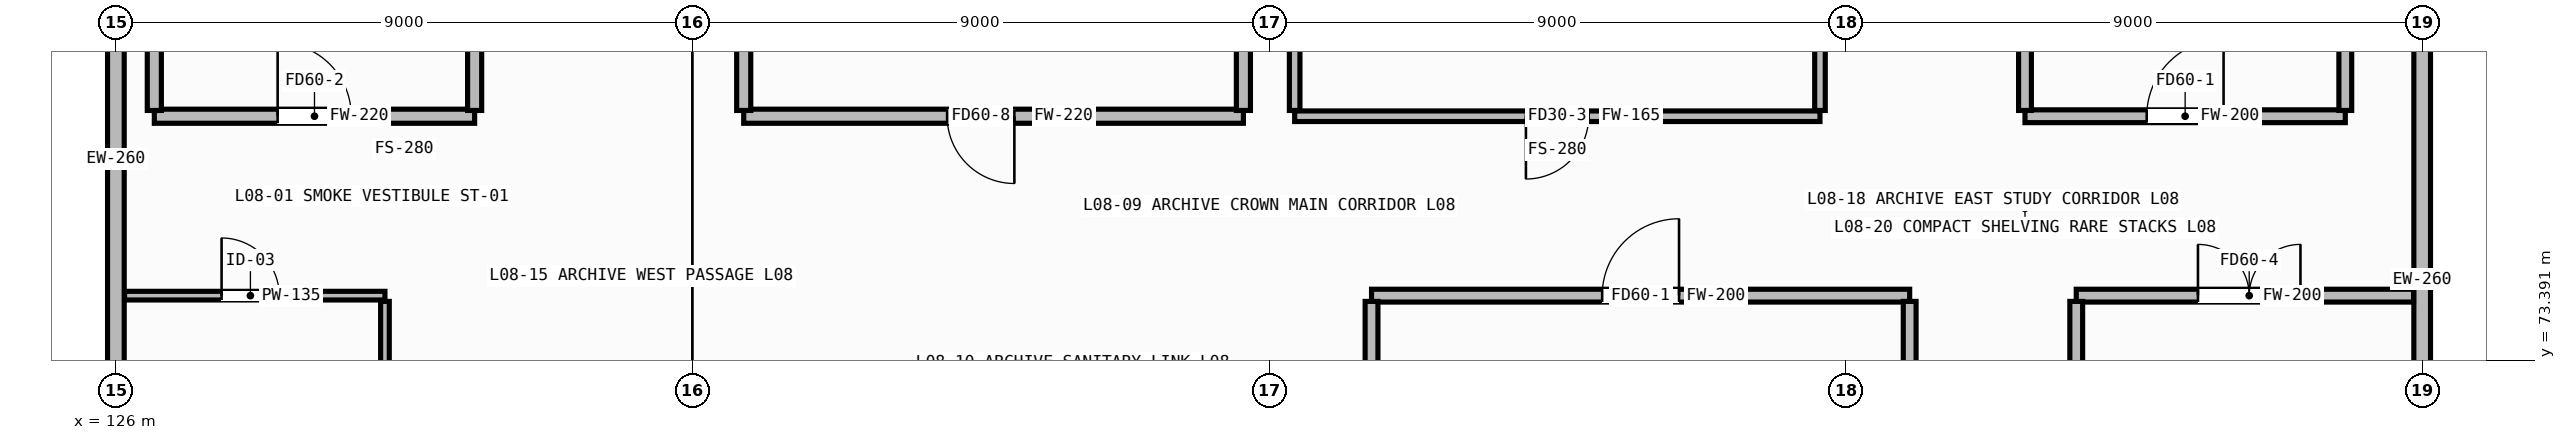
"""IFC4 building model, lengths in metres.
Left out: names, types, materials, properties, quantities, classifications, styles, units other than length and angle.
Written with IfcOpenShell. Run it as: python <this file> out.ifc"""

import sys

from ifc_helpers import new_model, si_unit, direction, frame, frame_2d, origin, place, context, subcontext, project, spatial, rectangle, extrude, element, fill, save


model = new_model("IFC4")
c1 = context("Model", 3, precision=1e-05, world=origin(), true_north=direction((0.0, 1.0)))
c2 = subcontext(c1, "Body", "Model", "MODEL_VIEW")
j1 = project(units=[si_unit("LENGTHUNIT", "METRE"), si_unit("PLANEANGLEUNIT", "RADIAN")], contexts=[c1])
p1 = place(None, origin())
s1 = spatial("IfcSite", under=j1, at=p1, CompositionType="ELEMENT")
p2 = place(p1, origin())
s2 = spatial("IfcBuilding", under=s1, at=p2, CompositionType="ELEMENT")
p3 = place(p2, frame((0.0, 0.0, 27.8)))
s3 = spatial("IfcBuildingStorey", under=s2, at=p3, CompositionType="ELEMENT", Elevation=27.8)
p4 = place(p3, frame((126.0, 72.25, 0.0), z_axis=(0.0, 0.0, 1.0), x_axis=(0.0, 1.0, 0.0)))
e1 = element("IfcWall", 1, at=p4, inside=s3, PredefinedType="STANDARD", context=c2, shape_type="SweptSolid", body=[
    extrude(rectangle(XDim=6.7, YDim=0.26, at=frame_2d((3.35, 0.0))), origin(), (0.0, 0.0, 1.0), 2.915),
])
p5 = place(p3, frame((162.0, 78.975, 0.0), z_axis=(0.0, 0.0, 1.0), x_axis=(0.0, -1.0, 0.0)))
e2 = element("IfcWall", 2, at=p5, inside=s3, PredefinedType="STANDARD", context=c2, shape_type="SweptSolid", body=[
    extrude(rectangle(XDim=6.75, YDim=0.26, at=frame_2d((3.375, 0.0))), origin(), (0.0, 0.0, 1.0), 2.915),
])
p6 = place(p3, frame((126.6, 77.2, 0.0), z_axis=(0.0, 0.0, 1.0), x_axis=(1.0, 0.0, 0.0)))
e3 = element("IfcWall", 3, at=p6, inside=s3, PredefinedType="PARTITIONING", context=c2, shape_type="SweptSolid", body=[
    extrude(rectangle(XDim=5.0, YDim=0.22, at=frame_2d((2.5, 0.0))), origin(), (0.0, 0.0, 1.0), 3.315),
])
p7 = place(p6, frame((1.925, 0.0, 0.0)))
e4 = element("IfcOpeningElement", 4, at=p7, cuts=e3, PredefinedType="OPENING", context=c2, shape_type="SweptSolid", body=[
    extrude(rectangle(XDim=1.15, YDim=2.1, at=frame_2d((0.575, 1.05))), frame((0.0, 0.122, 0.0), z_axis=(0.0, -1.0, 0.0), x_axis=(1.0, 0.0, 0.0)), (0.0, 0.0, 1.0), 0.244),
])
for number, where, z_axis, x_axis in (
    (5, (126.6, 77.29, 0.0), (0.0, 0.0, 1.0), (0.0, 1.0, 0.0)),
    (6, (131.6, 77.29, 0.0), (0.0, 0.0, 1.0), (0.0, 1.0, 0.0)),
):
    element("IfcWall", number, at=place(p3, frame(where, z_axis=z_axis, x_axis=x_axis)), inside=s3, PredefinedType="PARTITIONING", context=c2, shape_type="SweptSolid", body=[
        extrude(rectangle(XDim=3.82, YDim=0.22, at=frame_2d((1.91, 0.0))), origin(), (0.0, 0.0, 1.0), 3.315),
    ])
p8 = place(p3, frame((155.8, 77.2, 0.0), z_axis=(0.0, 0.0, 1.0), x_axis=(1.0, 0.0, 0.0)))
e7 = element("IfcWall", 7, at=p8, inside=s3, PredefinedType="PARTITIONING", context=c2, shape_type="SweptSolid", body=[
    extrude(rectangle(XDim=5.0, YDim=0.2, at=frame_2d((2.5, 0.0))), origin(), (0.0, 0.0, 1.0), 3.315),
])
p9 = place(p8, frame((1.9, 0.0, 0.0)))
e8 = element("IfcOpeningElement", 8, at=p9, cuts=e7, PredefinedType="OPENING", context=c2, shape_type="SweptSolid", body=[
    extrude(rectangle(XDim=1.2, YDim=2.1, at=frame_2d((0.6, 1.05))), frame((0.0, 0.112, 0.0), z_axis=(0.0, -1.0, 0.0), x_axis=(1.0, 0.0, 0.0)), (0.0, 0.0, 1.0), 0.224),
])
for number, where, z_axis, x_axis in (
    (9, (155.8, 77.29, 0.0), (0.0, 0.0, 1.0), (0.0, 1.0, 0.0)),
    (10, (160.8, 77.29, 0.0), (0.0, 0.0, 1.0), (0.0, 1.0, 0.0)),
):
    element("IfcWall", number, at=place(p3, frame(where, z_axis=z_axis, x_axis=x_axis)), inside=s3, PredefinedType="PARTITIONING", context=c2, shape_type="SweptSolid", body=[
        extrude(rectangle(XDim=3.82, YDim=0.2, at=frame_2d((1.91, 0.0))), origin(), (0.0, 0.0, 1.0), 3.315),
    ])
p10 = place(p3, frame((135.8, 77.2, 0.0), z_axis=(0.0, 0.0, 1.0), x_axis=(1.0, 0.0, 0.0)))
e11 = element("IfcWall", 11, at=p10, inside=s3, PredefinedType="PARTITIONING", context=c2, shape_type="SweptSolid", body=[
    extrude(rectangle(XDim=7.8, YDim=0.22, at=frame_2d((3.9, 0.0))), origin(), (0.0, 0.0, 1.0), 3.315),
])
p11 = place(p10, frame((3.175, 0.0, 0.0)))
e12 = element("IfcOpeningElement", 12, at=p11, cuts=e11, PredefinedType="OPENING", context=c2, shape_type="SweptSolid", body=[
    extrude(rectangle(XDim=1.05, YDim=2.02, at=frame_2d((0.525, 1.01))), frame((0.0, 0.122, 0.0), z_axis=(0.0, -1.0, 0.0), x_axis=(1.0, 0.0, 0.0)), (0.0, 0.0, 1.0), 0.244),
])
for number, where, z_axis, x_axis in (
    (13, (135.8, 77.29, 0.0), (0.0, 0.0, 1.0), (0.0, 1.0, 0.0)),
    (14, (143.6, 77.29, 0.0), (0.0, 0.0, 1.0), (0.0, 1.0, 0.0)),
):
    element("IfcWall", number, at=place(p3, frame(where, z_axis=z_axis, x_axis=x_axis)), inside=s3, PredefinedType="PARTITIONING", context=c2, shape_type="SweptSolid", body=[
        extrude(rectangle(XDim=3.82, YDim=0.22, at=frame_2d((1.91, 0.0))), origin(), (0.0, 0.0, 1.0), 3.315),
    ])
p12 = place(p3, frame((144.4, 77.2, 0.0), z_axis=(0.0, 0.0, 1.0), x_axis=(1.0, 0.0, 0.0)))
e15 = element("IfcWall", 15, at=p12, inside=s3, PredefinedType="PARTITIONING", context=c2, shape_type="SweptSolid", body=[
    extrude(rectangle(XDim=8.2, YDim=0.165, at=frame_2d((4.1, 0.0))), origin(), (0.0, 0.0, 1.0), 3.315),
])
p13 = place(p12, frame((3.61, 0.0, 0.0)))
e16 = element("IfcOpeningElement", 16, at=p13, cuts=e15, PredefinedType="OPENING", context=c2, shape_type="SweptSolid", body=[
    extrude(rectangle(XDim=0.98, YDim=2.02, at=frame_2d((0.49, 1.01))), frame((0.0, 0.094, 0.0), z_axis=(0.0, -1.0, 0.0), x_axis=(1.0, 0.0, 0.0)), (0.0, 0.0, 1.0), 0.189),
])
for number, where, z_axis, x_axis in (
    (17, (144.4, 77.29, 0.0), (0.0, 0.0, 1.0), (0.0, 1.0, 0.0)),
    (18, (152.6, 77.29, 0.0), (0.0, 0.0, 1.0), (0.0, 1.0, 0.0)),
):
    element("IfcWall", number, at=place(p3, frame(where, z_axis=z_axis, x_axis=x_axis)), inside=s3, PredefinedType="PARTITIONING", context=c2, shape_type="SweptSolid", body=[
        extrude(rectangle(XDim=3.82, YDim=0.165, at=frame_2d((1.91, 0.0))), origin(), (0.0, 0.0, 1.0), 3.315),
    ])
p14 = place(p3, frame((126.135, 74.4, 0.0), z_axis=(0.0, 0.0, 1.0), x_axis=(1.0, 0.0, 0.0)))
e19 = element("IfcWall", 19, at=p14, inside=s3, PredefinedType="PARTITIONING", context=c2, shape_type="SweptSolid", body=[
    extrude(rectangle(XDim=4.065, YDim=0.135, at=frame_2d((2.032, 0.0))), origin(), (0.0, 0.0, 1.0), 3.315),
])
p15 = place(p14, frame((1.515, 0.0, 0.0)))
e20 = element("IfcOpeningElement", 20, at=p15, cuts=e19, PredefinedType="OPENING", context=c2, shape_type="SweptSolid", body=[
    extrude(rectangle(XDim=0.9, YDim=2.02, at=frame_2d((0.45, 1.01))), frame((0.0, 0.08, 0.0), z_axis=(0.0, -1.0, 0.0), x_axis=(1.0, 0.0, 0.0)), (0.0, 0.0, 1.0), 0.159),
])
p16 = place(p3, frame((130.2, 66.09, 0.0), z_axis=(0.0, 0.0, 1.0), x_axis=(0.0, 1.0, 0.0)))
e21 = element("IfcWall", 21, at=p16, inside=s3, PredefinedType="PARTITIONING", context=c2, shape_type="SweptSolid", body=[
    extrude(rectangle(XDim=8.22, YDim=0.135, at=frame_2d((4.11, 0.0))), origin(), (0.0, 0.0, 1.0), 3.315),
])
p17 = place(p3, frame((145.6, 74.4, 0.0), z_axis=(0.0, 0.0, 1.0), x_axis=(1.0, 0.0, 0.0)))
e22 = element("IfcWall", 22, at=p17, inside=s3, PredefinedType="PARTITIONING", context=c2, shape_type="SweptSolid", body=[
    extrude(rectangle(XDim=8.4, YDim=0.2, at=frame_2d((4.2, 0.0))), origin(), (0.0, 0.0, 1.0), 3.315),
])
p18 = place(p17, frame((3.6, 0.0, 0.0)))
e23 = element("IfcOpeningElement", 23, at=p18, cuts=e22, PredefinedType="OPENING", context=c2, shape_type="SweptSolid", body=[
    extrude(rectangle(XDim=1.2, YDim=2.1, at=frame_2d((0.6, 1.05))), frame((0.0, 0.112, 0.0), z_axis=(0.0, -1.0, 0.0), x_axis=(1.0, 0.0, 0.0)), (0.0, 0.0, 1.0), 0.224),
])
p19 = place(p3, frame((145.6, 57.635, 0.0), z_axis=(0.0, 0.0, 1.0), x_axis=(0.0, 1.0, 0.0)))
e24 = element("IfcWall", 24, at=p19, inside=s3, PredefinedType="PARTITIONING", context=c2, shape_type="SweptSolid", body=[
    extrude(rectangle(XDim=16.675, YDim=0.2, at=frame_2d((8.337, 0.0))), origin(), (0.0, 0.0, 1.0), 3.315),
])
p20 = place(p3, frame((154.0, 57.735, 0.0), z_axis=(0.0, 0.0, 1.0), x_axis=(0.0, 1.0, 0.0)))
e25 = element("IfcWall", 25, at=p20, inside=s3, PredefinedType="PARTITIONING", context=c2, shape_type="SweptSolid", body=[
    extrude(rectangle(XDim=16.575, YDim=0.2, at=frame_2d((8.288, 0.0))), origin(), (0.0, 0.0, 1.0), 3.315),
])
p21 = place(p3, frame((156.6, 74.4, 0.0), z_axis=(0.0, 0.0, 1.0), x_axis=(1.0, 0.0, 0.0)))
e26 = element("IfcWall", 26, at=p21, inside=s3, PredefinedType="PARTITIONING", context=c2, shape_type="SweptSolid", body=[
    extrude(rectangle(XDim=5.265, YDim=0.2, at=frame_2d((2.632, 0.0))), origin(), (0.0, 0.0, 1.0), 3.315),
])
p22 = place(p21, frame((1.9, 0.0, 0.0)))
e27 = element("IfcOpeningElement", 27, at=p22, cuts=e26, PredefinedType="OPENING", context=c2, shape_type="SweptSolid", body=[
    extrude(rectangle(XDim=1.6, YDim=2.12, at=frame_2d((0.8, 1.06))), frame((0.0, 0.112, 0.0), z_axis=(0.0, -1.0, 0.0), x_axis=(1.0, 0.0, 0.0)), (0.0, 0.0, 1.0), 0.224),
])
p23 = place(p3, frame((156.6, 66.09, 0.0), z_axis=(0.0, 0.0, 1.0), x_axis=(0.0, 1.0, 0.0)))
e28 = element("IfcWall", 28, at=p23, inside=s3, PredefinedType="PARTITIONING", context=c2, shape_type="SweptSolid", body=[
    extrude(rectangle(XDim=8.22, YDim=0.2, at=frame_2d((4.11, 0.0))), origin(), (0.0, 0.0, 1.0), 3.315),
])
p24 = place(p7, origin())
e29 = element("IfcDoor", 29, at=p24, inside=s3, OperationType="SINGLE_SWING_LEFT", PredefinedType="DOOR", context=c2, shape_type="SweptSolid", body=[
    extrude(rectangle(XDim=1.15, YDim=2.1, at=frame_2d((0.575, 1.05))), frame((0.0, 0.025, 0.0), z_axis=(0.0, -1.0, 0.0), x_axis=(1.0, 0.0, 0.0)), (0.0, 0.0, 1.0), 0.05),
])
fill(e4, e29)
p25 = place(p9, origin())
e30 = element("IfcDoor", 30, at=p25, inside=s3, OperationType="SINGLE_SWING_RIGHT", PredefinedType="DOOR", context=c2, shape_type="SweptSolid", body=[
    extrude(rectangle(XDim=1.2, YDim=2.1, at=frame_2d((0.6, 1.05))), frame((0.0, 0.025, 0.0), z_axis=(0.0, -1.0, 0.0), x_axis=(1.0, 0.0, 0.0)), (0.0, 0.0, 1.0), 0.05),
])
fill(e8, e30)
p26 = place(p11, frame((1.05, 0.0, 0.0), z_axis=(0.0, 0.0, 1.0), x_axis=(-1.0, 0.0, 0.0)))
e31 = element("IfcDoor", 31, at=p26, inside=s3, OperationType="SINGLE_SWING_LEFT", PredefinedType="DOOR", context=c2, shape_type="SweptSolid", body=[
    extrude(rectangle(XDim=1.05, YDim=2.02, at=frame_2d((0.525, 1.01))), frame((0.0, 0.025, 0.0), z_axis=(0.0, -1.0, 0.0), x_axis=(1.0, 0.0, 0.0)), (0.0, 0.0, 1.0), 0.05),
])
fill(e12, e31)
p27 = place(p13, frame((0.98, 0.0, 0.0), z_axis=(0.0, 0.0, 1.0), x_axis=(-1.0, 0.0, 0.0)))
e32 = element("IfcDoor", 32, at=p27, inside=s3, OperationType="SINGLE_SWING_RIGHT", PredefinedType="DOOR", context=c2, shape_type="SweptSolid", body=[
    extrude(rectangle(XDim=0.98, YDim=2.02, at=frame_2d((0.49, 1.01))), frame((0.0, 0.025, 0.0), z_axis=(0.0, -1.0, 0.0), x_axis=(1.0, 0.0, 0.0)), (0.0, 0.0, 1.0), 0.05),
])
fill(e16, e32)
p28 = place(p15, origin())
e33 = element("IfcDoor", 33, at=p28, inside=s3, OperationType="SINGLE_SWING_LEFT", PredefinedType="DOOR", context=c2, shape_type="SweptSolid", body=[
    extrude(rectangle(XDim=0.9, YDim=2.02, at=frame_2d((0.45, 1.01))), frame((0.0, 0.025, 0.0), z_axis=(0.0, -1.0, 0.0), x_axis=(1.0, 0.0, 0.0)), (0.0, 0.0, 1.0), 0.05),
])
fill(e20, e33)
p29 = place(p18, origin())
e34 = element("IfcDoor", 34, at=p29, inside=s3, OperationType="SINGLE_SWING_RIGHT", PredefinedType="DOOR", context=c2, shape_type="SweptSolid", body=[
    extrude(rectangle(XDim=1.2, YDim=2.1, at=frame_2d((0.6, 1.05))), frame((0.0, 0.025, 0.0), z_axis=(0.0, -1.0, 0.0), x_axis=(1.0, 0.0, 0.0)), (0.0, 0.0, 1.0), 0.05),
])
fill(e23, e34)
p30 = place(p22, origin())
e35 = element("IfcDoor", 35, at=p30, inside=s3, OperationType="DOUBLE_DOOR_SINGLE_SWING", PredefinedType="DOOR", context=c2, shape_type="SweptSolid", body=[
    extrude(rectangle(XDim=1.6, YDim=2.12, at=frame_2d((0.8, 1.06))), frame((0.0, 0.025, 0.0), z_axis=(0.0, -1.0, 0.0), x_axis=(1.0, 0.0, 0.0)), (0.0, 0.0, 1.0), 0.05),
])
fill(e27, e35)
save(model, sys.argv[1])
